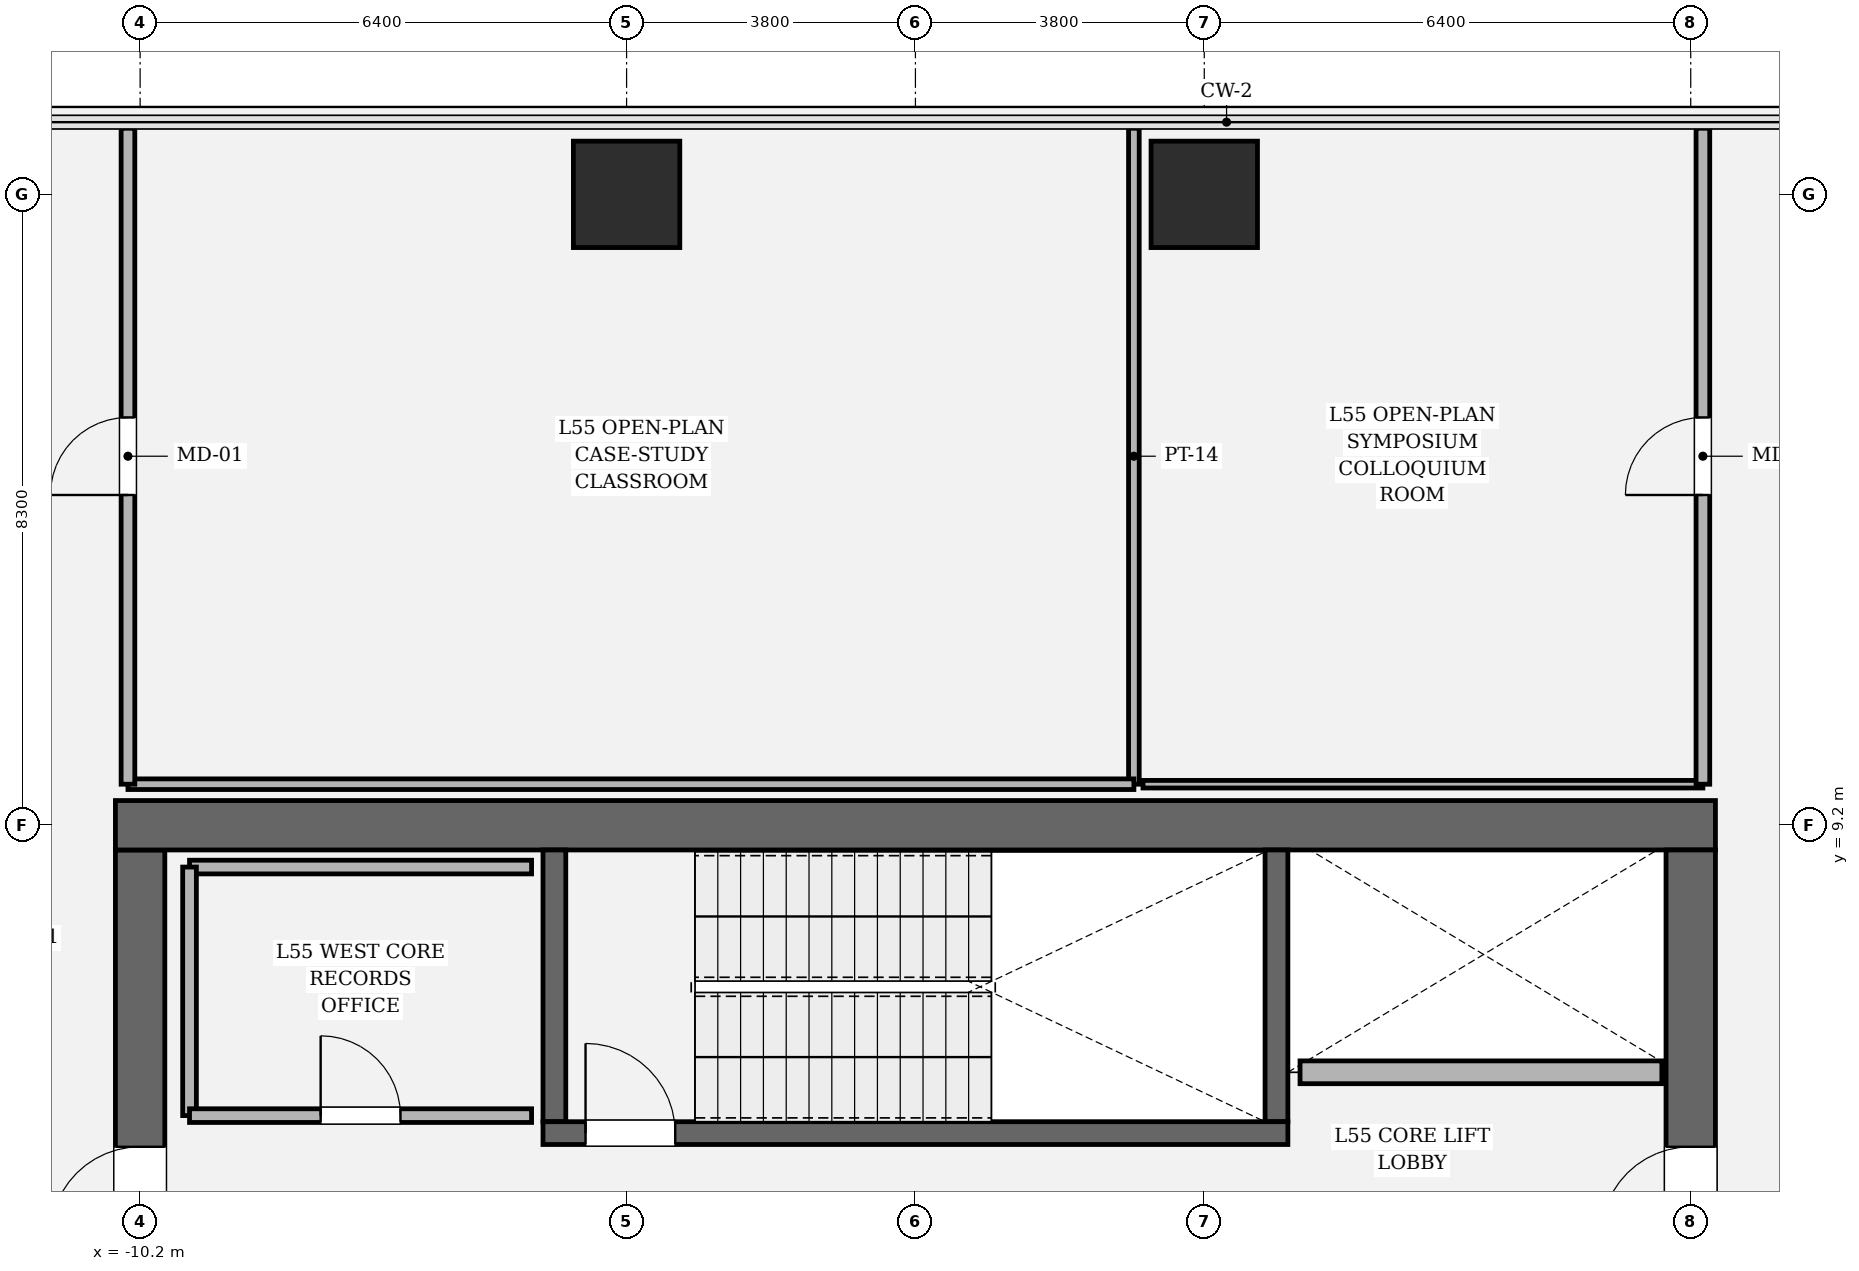
"""IFC4 building model, lengths in metres.
Left out: names, types, materials, properties, quantities, classifications, styles, units other than length and angle.
Written with IfcOpenShell. Run it as: python <this file> out.ifc"""

import sys

from ifc_helpers import new_model, si_unit, direction, frame, frame_2d, origin, origin_2d, place, context, subcontext, project, spatial, rectangle, hollow_rectangle, extrude, element, fill, save


model = new_model("IFC4")
c1 = context("Model", 3, precision=1e-05, world=origin(), true_north=direction((0.0, 1.0)))
c2 = subcontext(c1, "Body", "Model", "MODEL_VIEW")
j1 = project(units=[si_unit("LENGTHUNIT", "METRE"), si_unit("PLANEANGLEUNIT", "RADIAN")], contexts=[c1])
p1 = place(None, origin())
s1 = spatial("IfcSite", under=j1, at=p1, CompositionType="ELEMENT")
p2 = place(p1, origin())
s2 = spatial("IfcBuilding", under=s1, at=p2, CompositionType="ELEMENT")
p3 = place(p2, frame((0.0, 0.0, 232.95)))
s3 = spatial("IfcBuildingStorey", under=s2, at=p3, CompositionType="ELEMENT", Elevation=232.95)
p4 = place(p3, frame((-10.2, -8.875, 0.0), z_axis=(0.0, 0.0, 1.0), x_axis=(0.0, 1.0, 0.0)))
e1 = element("IfcWall", 1, at=p4, inside=s3, PredefinedType="SHEAR", context=c2, shape_type="SweptSolid", body=[
    extrude(rectangle(XDim=17.75, YDim=0.65, at=frame_2d((8.875, 0.0))), origin(), (0.0, 0.0, 1.0), 4.05),
])
p5 = place(p4, frame((12.665, 0.0, 0.0)))
e2 = element("IfcOpeningElement", 2, at=p5, cuts=e1, PredefinedType="OPENING", context=c2, shape_type="SweptSolid", body=[
    extrude(rectangle(XDim=1.18, YDim=2.2, at=frame_2d((0.59, 1.1))), frame((0.0, 0.335, 0.0), z_axis=(0.0, -1.0, 0.0), x_axis=(1.0, 0.0, 0.0)), (0.0, 0.0, 1.0), 0.67),
])
p6 = place(p3, frame((-10.525, 9.2, 0.0), z_axis=(0.0, 0.0, 1.0), x_axis=(1.0, 0.0, 0.0)))
e3 = element("IfcWall", 3, at=p6, inside=s3, PredefinedType="SHEAR", context=c2, shape_type="SweptSolid", body=[
    extrude(rectangle(XDim=21.05, YDim=0.65, at=frame_2d((10.525, 0.0))), origin(), (0.0, 0.0, 1.0), 4.05),
])
p7 = place(p3, frame((10.2, 8.875, 0.0), z_axis=(0.0, 0.0, 1.0), x_axis=(0.0, -1.0, 0.0)))
e4 = element("IfcWall", 4, at=p7, inside=s3, PredefinedType="SHEAR", context=c2, shape_type="SweptSolid", body=[
    extrude(rectangle(XDim=17.75, YDim=0.65, at=frame_2d((8.875, 0.0))), origin(), (0.0, 0.0, 1.0), 4.05),
])
p8 = place(p7, frame((3.905, 0.0, 0.0)))
e5 = element("IfcOpeningElement", 5, at=p8, cuts=e4, PredefinedType="OPENING", context=c2, shape_type="SweptSolid", body=[
    extrude(rectangle(XDim=1.18, YDim=2.2, at=frame_2d((0.59, 1.1))), frame((0.0, 0.335, 0.0), z_axis=(0.0, -1.0, 0.0), x_axis=(1.0, 0.0, 0.0)), (0.0, 0.0, 1.0), 0.67),
])
for number, where, z_axis, x_axis in (
    (6, (-4.75, 5.3, 0.0), (0.0, 0.0, 1.0), (0.0, 1.0, 0.0)),
    (7, (4.75, 8.875, 0.0), (0.0, 0.0, 1.0), (0.0, -1.0, 0.0)),
):
    element("IfcWall", number, at=place(p3, frame(where, z_axis=z_axis, x_axis=x_axis)), inside=s3, PredefinedType="SOLIDWALL", context=c2, shape_type="SweptSolid", body=[
        extrude(rectangle(XDim=3.575, YDim=0.3, at=frame_2d((1.788, 0.0))), origin(), (0.0, 0.0, 1.0), 4.05),
    ])
p9 = place(p3, frame((-4.9, 5.15, 0.0), z_axis=(0.0, 0.0, 1.0), x_axis=(1.0, 0.0, 0.0)))
e8 = element("IfcWall", 8, at=p9, inside=s3, PredefinedType="SOLIDWALL", context=c2, shape_type="SweptSolid", body=[
    extrude(rectangle(XDim=9.8, YDim=0.3, at=frame_2d((4.9, 0.0))), origin(), (0.0, 0.0, 1.0), 4.05),
])
p10 = place(p9, frame((0.56, 0.0, 0.0)))
e9 = element("IfcOpeningElement", 9, at=p10, cuts=e8, PredefinedType="OPENING", context=c2, shape_type="SweptSolid", body=[
    extrude(rectangle(XDim=1.18, YDim=2.2, at=frame_2d((0.59, 1.1))), frame((0.0, 0.16, 0.0), z_axis=(0.0, -1.0, 0.0), x_axis=(1.0, 0.0, 0.0)), (0.0, 0.0, 1.0), 0.32),
])
for number, where, z_axis, x_axis in (
    (10, (3.8, 17.5, 0.0), (0.0, 0.0, 1.0), (1.0, 0.0, 0.0)),
    (11, (-3.8, 17.5, 0.0), (0.0, 0.0, 1.0), (1.0, 0.0, 0.0)),
):
    element("IfcColumn", number, at=place(p3, frame(where, z_axis=z_axis, x_axis=x_axis)), inside=s3, PredefinedType="COLUMN", context=c2, shape_type="SweptSolid", body=[
        extrude(hollow_rectangle(XDim=1.4, YDim=1.4, WallThickness=0.042, at=origin_2d()), origin(), (0.0, 0.0, 1.0), 4.05),
    ])
p11 = place(p3, frame((5.06, 5.95, 0.0), z_axis=(0.0, 0.0, 1.0), x_axis=(1.0, 0.0, 0.0)))
e12 = element("IfcWall", 12, at=p11, inside=s3, PredefinedType="SOLIDWALL", context=c2, shape_type="SweptSolid", body=[
    extrude(rectangle(XDim=4.76, YDim=0.3, at=frame_2d((2.38, 0.0))), origin(), (0.0, 0.0, 1.0), 3.73),
])
p12 = place(p3, frame((-5.05, 8.65, 0.0), z_axis=(0.0, 0.0, 1.0), x_axis=(-1.0, 0.0, 0.0)))
e13 = element("IfcWall", 13, at=p12, inside=s3, PredefinedType="PARTITIONING", context=c2, shape_type="SweptSolid", body=[
    extrude(rectangle(XDim=4.5, YDim=0.18, at=frame_2d((2.25, 0.0))), origin(), (0.0, 0.0, 1.0), 3.73),
])
p13 = place(p3, frame((-9.55, 8.65, 0.0), z_axis=(0.0, 0.0, 1.0), x_axis=(0.0, -1.0, 0.0)))
e14 = element("IfcWall", 14, at=p13, inside=s3, PredefinedType="PARTITIONING", context=c2, shape_type="SweptSolid", body=[
    extrude(rectangle(XDim=3.27, YDim=0.18, at=frame_2d((1.635, 0.0))), origin(), (0.0, 0.0, 1.0), 3.73),
])
p14 = place(p3, frame((-9.55, 5.38, 0.0), z_axis=(0.0, 0.0, 1.0), x_axis=(1.0, 0.0, 0.0)))
e15 = element("IfcWall", 15, at=p14, inside=s3, PredefinedType="PARTITIONING", context=c2, shape_type="SweptSolid", body=[
    extrude(rectangle(XDim=4.5, YDim=0.18, at=frame_2d((2.25, 0.0))), origin(), (0.0, 0.0, 1.0), 3.73),
])
p15 = place(p14, frame((1.725, 0.0, 0.0)))
e16 = element("IfcOpeningElement", 16, at=p15, cuts=e15, PredefinedType="OPENING", context=c2, shape_type="SweptSolid", body=[
    extrude(rectangle(XDim=1.05, YDim=2.2, at=frame_2d((0.525, 1.1))), frame((0.0, 0.1, 0.0), z_axis=(0.0, -1.0, 0.0), x_axis=(1.0, 0.0, 0.0)), (0.0, 0.0, 1.0), 0.2),
])
p16 = place(p3, frame((2.874, 18.37, 0.0), z_axis=(0.0, 0.0, 1.0), x_axis=(0.0, -1.0, 0.0)))
e17 = element("IfcWall", 17, at=p16, inside=s3, PredefinedType="PARTITIONING", context=c2, shape_type="SweptSolid", body=[
    extrude(rectangle(XDim=8.63, YDim=0.14, at=frame_2d((4.315, 0.0))), origin(), (0.0, 0.0, 1.0), 2.404),
])
p17 = place(p3, frame((2.874, 9.74, 0.0), z_axis=(0.0, 0.0, 1.0), x_axis=(-1.0, 0.0, 0.0)))
e18 = element("IfcWall", 18, at=p17, inside=s3, PredefinedType="PARTITIONING", context=c2, shape_type="SweptSolid", body=[
    extrude(rectangle(XDim=13.234, YDim=0.14, at=frame_2d((6.617, 0.0))), origin(), (0.0, 0.0, 1.0), 2.404),
])
p18 = place(p3, frame((-10.36, 9.74, 0.0), z_axis=(0.0, 0.0, 1.0), x_axis=(0.0, 1.0, 0.0)))
e19 = element("IfcWall", 19, at=p18, inside=s3, PredefinedType="PARTITIONING", context=c2, shape_type="SweptSolid", body=[
    extrude(rectangle(XDim=8.63, YDim=0.18, at=frame_2d((4.315, 0.0))), origin(), (0.0, 0.0, 1.0), 2.404),
])
p19 = place(p18, frame((3.805, 0.0, 0.0)))
e20 = element("IfcOpeningElement", 20, at=p19, cuts=e19, PredefinedType="OPENING", context=c2, shape_type="SweptSolid", body=[
    extrude(rectangle(XDim=1.02, YDim=2.2, at=frame_2d((0.51, 1.1))), frame((0.0, 0.1, 0.0), z_axis=(0.0, -1.0, 0.0), x_axis=(1.0, 0.0, 0.0)), (0.0, 0.0, 1.0), 0.2),
])
p20 = place(p3, frame((10.36, 9.74, 0.0), z_axis=(0.0, 0.0, 1.0), x_axis=(-1.0, 0.0, 0.0)))
e21 = element("IfcWall", 21, at=p20, inside=s3, PredefinedType="PARTITIONING", context=c2, shape_type="SweptSolid", body=[
    extrude(rectangle(XDim=7.366, YDim=0.1, at=frame_2d((3.683, 0.0))), origin(), (0.0, 0.0, 1.0), 2.404),
])
p21 = place(p3, frame((10.36, 18.37, 0.0), z_axis=(0.0, 0.0, 1.0), x_axis=(0.0, -1.0, 0.0)))
e22 = element("IfcWall", 22, at=p21, inside=s3, PredefinedType="PARTITIONING", context=c2, shape_type="SweptSolid", body=[
    extrude(rectangle(XDim=8.63, YDim=0.18, at=frame_2d((4.315, 0.0))), origin(), (0.0, 0.0, 1.0), 2.404),
])
p22 = place(p21, frame((3.805, 0.0, 0.0)))
e23 = element("IfcOpeningElement", 23, at=p22, cuts=e22, PredefinedType="OPENING", context=c2, shape_type="SweptSolid", body=[
    extrude(rectangle(XDim=1.02, YDim=2.2, at=frame_2d((0.51, 1.1))), frame((0.0, 0.1, 0.0), z_axis=(0.0, -1.0, 0.0), x_axis=(1.0, 0.0, 0.0)), (0.0, 0.0, 1.0), 0.2),
])
p23 = place(p10, origin())
e24 = element("IfcDoor", 24, at=p23, inside=s3, OperationType="SINGLE_SWING_LEFT", PredefinedType="DOOR", context=c2, shape_type="SweptSolid", body=[
    extrude(rectangle(XDim=1.18, YDim=2.2, at=frame_2d((0.59, 1.1))), frame((0.0, 0.025, 0.0), z_axis=(0.0, -1.0, 0.0), x_axis=(1.0, 0.0, 0.0)), (0.0, 0.0, 1.0), 0.05),
])
fill(e9, e24)
p24 = place(p5, origin())
e25 = element("IfcDoor", 25, at=p24, inside=s3, OperationType="SINGLE_SWING_LEFT", PredefinedType="DOOR", context=c2, shape_type="SweptSolid", body=[
    extrude(rectangle(XDim=1.18, YDim=2.2, at=frame_2d((0.59, 1.1))), frame((0.0, 0.025, 0.0), z_axis=(0.0, -1.0, 0.0), x_axis=(1.0, 0.0, 0.0)), (0.0, 0.0, 1.0), 0.05),
])
fill(e2, e25)
p25 = place(p8, origin())
e26 = element("IfcDoor", 26, at=p25, inside=s3, OperationType="SINGLE_SWING_RIGHT", PredefinedType="DOOR", context=c2, shape_type="SweptSolid", body=[
    extrude(rectangle(XDim=1.18, YDim=2.2, at=frame_2d((0.59, 1.1))), frame((0.0, 0.025, 0.0), z_axis=(0.0, -1.0, 0.0), x_axis=(1.0, 0.0, 0.0)), (0.0, 0.0, 1.0), 0.05),
])
fill(e5, e26)
p26 = place(p15, origin())
e27 = element("IfcDoor", 27, at=p26, inside=s3, OperationType="SINGLE_SWING_LEFT", PredefinedType="DOOR", context=c2, shape_type="SweptSolid", body=[
    extrude(rectangle(XDim=1.05, YDim=2.2, at=frame_2d((0.525, 1.1))), frame((0.0, 0.025, 0.0), z_axis=(0.0, -1.0, 0.0), x_axis=(1.0, 0.0, 0.0)), (0.0, 0.0, 1.0), 0.05),
])
fill(e16, e27)
p27 = place(p19, origin())
e28 = element("IfcDoor", 28, at=p27, inside=s3, OperationType="SINGLE_SWING_LEFT", PredefinedType="DOOR", context=c2, shape_type="SweptSolid", body=[
    extrude(rectangle(XDim=1.02, YDim=2.2, at=frame_2d((0.51, 1.1))), frame((0.0, 0.025, 0.0), z_axis=(0.0, -1.0, 0.0), x_axis=(1.0, 0.0, 0.0)), (0.0, 0.0, 1.0), 0.05),
])
fill(e20, e28)
p28 = place(p22, origin())
e29 = element("IfcDoor", 29, at=p28, inside=s3, OperationType="SINGLE_SWING_RIGHT", PredefinedType="DOOR", context=c2, shape_type="SweptSolid", body=[
    extrude(rectangle(XDim=1.02, YDim=2.2, at=frame_2d((0.51, 1.1))), frame((0.0, 0.025, 0.0), z_axis=(0.0, -1.0, 0.0), x_axis=(1.0, 0.0, 0.0)), (0.0, 0.0, 1.0), 0.05),
])
fill(e23, e29)
save(model, sys.argv[1])
